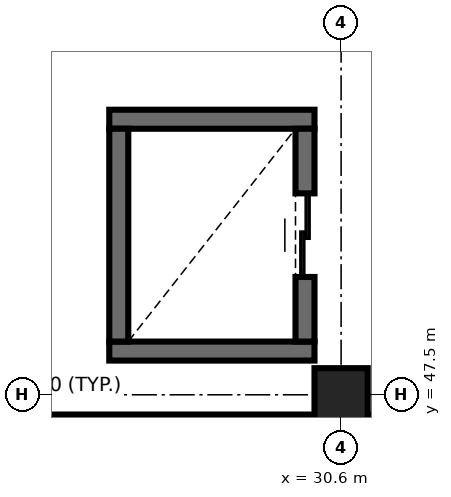
"""IFC4 building model, lengths in metres.
Left out: names, types, materials, properties, quantities, classifications, styles, units other than length and angle.
Written with IfcOpenShell. Run it as: python <this file> out.ifc"""

import sys

from ifc_helpers import new_model, si_unit, direction, frame, frame_2d, origin, origin_2d, place, context, subcontext, project, spatial, rectangle, extrude, element, fill, save


model = new_model("IFC4")
c1 = context("Model", 3, precision=1e-05, world=origin(), true_north=direction((0.0, 1.0)))
c2 = subcontext(c1, "Body", "Model", "MODEL_VIEW")
j1 = project(units=[si_unit("LENGTHUNIT", "METRE"), si_unit("PLANEANGLEUNIT", "RADIAN")], contexts=[c1])
p1 = place(None, origin())
s1 = spatial("IfcSite", under=j1, at=p1, CompositionType="ELEMENT")
p2 = place(p1, origin())
s2 = spatial("IfcBuilding", under=s1, at=p2, CompositionType="ELEMENT")
p3 = place(p2, origin())
s3 = spatial("IfcBuildingStorey", under=s2, at=p3, CompositionType="ELEMENT", Elevation=0.0)
p4 = place(p3, frame((30.6, 47.5, 0.0), z_axis=(0.0, 0.0, 1.0), x_axis=(1.0, 0.0, 0.0)))
e1 = element("IfcColumn", 1, at=p4, inside=s3, PredefinedType="COLUMN", context=c2, shape_type="SweptSolid", body=[
    extrude(rectangle(XDim=0.7, YDim=0.7, at=origin_2d()), origin(), (0.0, 0.0, 1.0), 4.8),
])
for number, where, z_axis, x_axis in (
    (2, (27.55, 48.075, 0.0), (0.0, 0.0, 1.0), (1.0, 0.0, 0.0)),
    (3, (30.25, 51.125, 0.0), (0.0, 0.0, 1.0), (-1.0, 0.0, 0.0)),
):
    element("IfcWall", number, at=place(p3, frame(where, z_axis=z_axis, x_axis=x_axis)), inside=s3, PredefinedType="SHEAR", context=c2, shape_type="SweptSolid", body=[
        extrude(rectangle(XDim=2.7, YDim=0.25, at=frame_2d((1.35, 0.0))), origin(), (0.0, 0.0, 1.0), 4.8),
    ])
p5 = place(p3, frame((27.675, 51.0, 0.0), z_axis=(0.0, 0.0, 1.0), x_axis=(0.0, -1.0, 0.0)))
e4 = element("IfcWall", 4, at=p5, inside=s3, PredefinedType="SHEAR", context=c2, shape_type="SweptSolid", body=[
    extrude(rectangle(XDim=2.8, YDim=0.25, at=frame_2d((1.4, 0.0))), origin(), (0.0, 0.0, 1.0), 4.8),
])
p6 = place(p3, frame((30.125, 48.2, 0.0), z_axis=(0.0, 0.0, 1.0), x_axis=(0.0, 1.0, 0.0)))
e5 = element("IfcWall", 5, at=p6, inside=s3, PredefinedType="SHEAR", context=c2, shape_type="SweptSolid", body=[
    extrude(rectangle(XDim=2.8, YDim=0.25, at=frame_2d((1.4, 0.0))), origin(), (0.0, 0.0, 1.0), 4.8),
])
p7 = place(p6, frame((0.85, 0.0, 0.0)))
e6 = element("IfcOpeningElement", 6, at=p7, cuts=e5, PredefinedType="OPENING", context=c2, shape_type="SweptSolid", body=[
    extrude(rectangle(XDim=1.1, YDim=2.15, at=frame_2d((0.55, 1.075))), frame((0.0, 0.135, 0.0), z_axis=(0.0, -1.0, 0.0), x_axis=(1.0, 0.0, 0.0)), (0.0, 0.0, 1.0), 0.27),
])
p8 = place(p3, frame((5.922, 47.07, 0.0), z_axis=(0.0, 0.0, 1.0), x_axis=(1.0, 0.0, 0.0)))
e7 = element("IfcWall", 7, at=p8, inside=s3, PredefinedType="SOLIDWALL", context=c2, shape_type="SweptSolid", body=[
    extrude(rectangle(XDim=41.478, YDim=0.34, at=frame_2d((20.739, 0.0))), origin(), (0.0, 0.0, 1.0), 4.55),
])
p9 = place(p8, frame((25.478, 0.0, 0.0)))
e8 = element("IfcOpeningElement", 8, at=p9, cuts=e7, PredefinedType="OPENING", context=c2, shape_type="SweptSolid", body=[
    extrude(rectangle(XDim=2.0, YDim=2.4, at=frame_2d((1.0, 1.2))), frame((0.0, 0.18, 0.0), z_axis=(0.0, -1.0, 0.0), x_axis=(1.0, 0.0, 0.0)), (0.0, 0.0, 1.0), 0.36),
])
p10 = place(p8, frame((3.543, 0.0, 0.9)))
e9 = element("IfcOpeningElement", 9, at=p10, cuts=e7, PredefinedType="OPENING", context=c2, shape_type="SweptSolid", body=[
    extrude(rectangle(XDim=2.25, YDim=1.95, at=frame_2d((1.125, 0.975))), frame((0.0, 0.18, 0.0), z_axis=(0.0, -1.0, 0.0), x_axis=(1.0, 0.0, 0.0)), (0.0, 0.0, 1.0), 0.36),
])
p11 = place(p8, frame((28.883, 0.0, 0.9)))
e10 = element("IfcOpeningElement", 10, at=p11, cuts=e7, PredefinedType="OPENING", context=c2, shape_type="SweptSolid", body=[
    extrude(rectangle(XDim=2.85, YDim=1.95, at=frame_2d((1.425, 0.975))), frame((0.0, 0.18, 0.0), z_axis=(0.0, -1.0, 0.0), x_axis=(1.0, 0.0, 0.0)), (0.0, 0.0, 1.0), 0.36),
])
p12 = place(p8, frame((33.578, 0.0, 0.9)))
e11 = element("IfcOpeningElement", 11, at=p12, cuts=e7, PredefinedType="OPENING", context=c2, shape_type="SweptSolid", body=[
    extrude(rectangle(XDim=2.2, YDim=1.65, at=frame_2d((1.1, 0.825))), frame((0.0, 0.18, 0.0), z_axis=(0.0, -1.0, 0.0), x_axis=(1.0, 0.0, 0.0)), (0.0, 0.0, 1.0), 0.36),
])
p13 = place(p8, frame((37.928, 0.0, 0.9)))
e12 = element("IfcOpeningElement", 12, at=p13, cuts=e7, PredefinedType="OPENING", context=c2, shape_type="SweptSolid", body=[
    extrude(rectangle(XDim=1.5, YDim=1.8, at=frame_2d((0.75, 0.9))), frame((0.0, 0.18, 0.0), z_axis=(0.0, -1.0, 0.0), x_axis=(1.0, 0.0, 0.0)), (0.0, 0.0, 1.0), 0.36),
])
p14 = place(p7, origin())
e13 = element("IfcDoor", 13, at=p14, inside=s3, OperationType="DOUBLE_DOOR_SLIDING", PredefinedType="DOOR", context=c2, shape_type="SweptSolid", body=[
    extrude(rectangle(XDim=1.1, YDim=2.15, at=frame_2d((0.55, 1.075))), frame((0.0, 0.025, 0.0), z_axis=(0.0, -1.0, 0.0), x_axis=(1.0, 0.0, 0.0)), (0.0, 0.0, 1.0), 0.05),
])
fill(e6, e13)
save(model, sys.argv[1])
